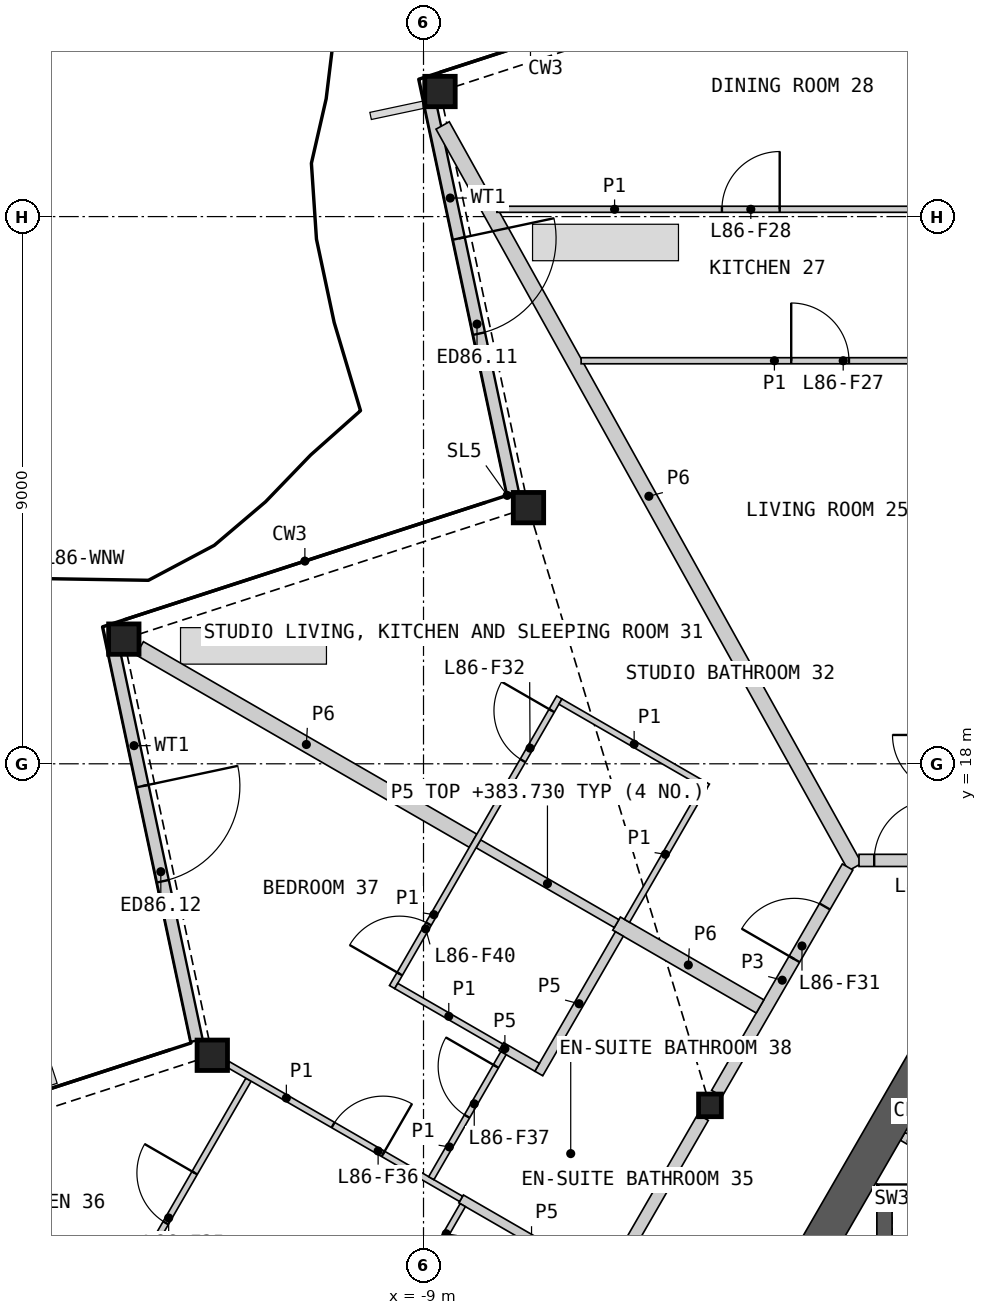
"""IFC4 building model, lengths in metres.
Left out: names, types, materials, properties, quantities, classifications, styles, units other than length and angle.
Written with IfcOpenShell. Run it as: python <this file> out.ifc"""

import sys

from ifc_helpers import new_model, si_unit, direction, frame, frame_2d, origin, origin_2d, place, context, subcontext, project, spatial, polyline, rectangle, hollow_rectangle, i_section, outline, extrude, element, fill, save


model = new_model("IFC4")
c1 = context("Model", 3, precision=1e-05, world=origin(), true_north=direction((0.0, 1.0)))
c2 = subcontext(c1, "Body", "Model", "MODEL_VIEW")
j1 = project(units=[si_unit("LENGTHUNIT", "METRE"), si_unit("PLANEANGLEUNIT", "RADIAN")], contexts=[c1])
p1 = place(None, origin())
s1 = spatial("IfcSite", under=j1, at=p1, CompositionType="ELEMENT")
p2 = place(p1, origin())
s2 = spatial("IfcBuilding", under=s1, at=p2, CompositionType="ELEMENT")
p3 = place(p2, frame((0.0, 0.0, 381.4)))
s3 = spatial("IfcBuildingStorey", under=s2, at=p3, CompositionType="ELEMENT", Elevation=381.4)
for number, where, z_axis, x_axis in (
    (1, (-8.729, 29.057, 0.0), (0.0, 0.0, 1.0), (1.0, 0.0, 0.0)),
    (2, (-7.274, 22.213, 0.0), (0.0, 0.0, 1.0), (1.0, 0.0, 0.0)),
    (3, (-13.929, 20.051, 0.0), (0.0, 0.0, 1.0), (1.0, 0.0, 0.0)),
    (4, (-12.474, 13.206, 0.0), (0.0, 0.0, 1.0), (1.0, 0.0, 0.0)),
):
    element("IfcColumn", number, at=place(p3, frame(where, z_axis=z_axis, x_axis=x_axis)), inside=s3, PredefinedType="COLUMN", context=c2, shape_type="SweptSolid", body=[
        extrude(hollow_rectangle(XDim=0.5, YDim=0.5, WallThickness=0.03, at=origin_2d()), origin(), (0.0, 0.0, 1.0), 3.4),
    ])
p4 = place(p3, frame((-4.289, 12.382, 0.0), z_axis=(0.0, 0.0, 1.0), x_axis=(1.0, 0.0, 0.0)))
e5 = element("IfcColumn", 5, at=p4, inside=s3, PredefinedType="COLUMN", context=c2, shape_type="SweptSolid", body=[
    extrude(i_section(OverallWidth=0.374, OverallDepth=0.372, WebThickness=0.016, FlangeThickness=0.026, at=origin_2d()), origin(), (0.0, 0.0, 1.0), 3.4),
])
p5 = place(p3, frame((-8.905, 28.922, 0.0), z_axis=(0.0, 0.0, 1.0), x_axis=(0.207917488951, -0.978146368285, 0.0)))
e6 = element("IfcWall", 6, at=p5, inside=s3, PredefinedType="SOLIDWALL", context=c2, shape_type="SweptSolid", body=[
    extrude(rectangle(XDim=6.612, YDim=0.2, at=frame_2d((3.306, 0.0))), origin(), (0.0, 0.0, 1.0), 2.634),
])
p6 = place(p5, frame((2.333, 0.0, 0.0)))
e7 = element("IfcOpeningElement", 7, at=p6, cuts=e6, PredefinedType="OPENING", context=c2, shape_type="SweptSolid", body=[
    extrude(rectangle(XDim=1.6, YDim=2.25, at=frame_2d((0.8, 1.125))), frame((0.0, 0.11, 0.0), z_axis=(0.0, -1.0, 0.0), x_axis=(1.0, 0.0, 0.0)), (0.0, 0.0, 1.0), 0.22),
])
p7 = place(p3, frame((-14.104, 19.915, 0.0), z_axis=(0.0, 0.0, 1.0), x_axis=(0.207924998532, -0.978144771997, 0.0)))
e8 = element("IfcWall", 8, at=p7, inside=s3, PredefinedType="SOLIDWALL", context=c2, shape_type="SweptSolid", body=[
    extrude(rectangle(XDim=6.612, YDim=0.2, at=frame_2d((3.306, 0.0))), origin(), (0.0, 0.0, 1.0), 2.634),
])
p8 = place(p7, frame((2.333, 0.0, 0.0)))
e9 = element("IfcOpeningElement", 9, at=p8, cuts=e8, PredefinedType="OPENING", context=c2, shape_type="SweptSolid", body=[
    extrude(rectangle(XDim=1.6, YDim=2.25, at=frame_2d((0.8, 1.125))), frame((0.0, 0.11, 0.0), z_axis=(0.0, -1.0, 0.0), x_axis=(1.0, 0.0, 0.0)), (0.0, 0.0, 1.0), 0.22),
])
p9 = place(p3, origin())
e10 = element("IfcWall", 10, at=p9, inside=s3, PredefinedType="SHEAR", context=c2, shape_type="SweptSolid", body=[
    extrude(outline(polyline([(1.544, 11.087), (-1.544, 11.087), (-1.294, 10.837), (1.294, 10.837), (1.544, 11.087)])), origin(), (0.0, 0.0, 1.0), 3.1),
])
p10 = place(p3, origin())
e11 = element("IfcWall", 11, at=p10, inside=s3, PredefinedType="SHEAR", context=c2, shape_type="SweptSolid", body=[
    extrude(outline(polyline([(-1.294, 10.837), (-1.544, 11.087), (-1.544, 5.237), (-1.294, 5.237), (-1.294, 10.837)])), origin(), (0.0, 0.0, 1.0), 3.1),
])
p11 = place(p3, frame((-1.119, 11.873, 0.0), z_axis=(0.0, 0.0, 1.0), x_axis=(0.865992812752, -0.500056445075, 0.0)))
e12 = element("IfcWall", 12, at=p11, inside=s3, PredefinedType="PARTITIONING", context=c2, shape_type="SweptSolid", body=[
    extrude(rectangle(XDim=1.582, YDim=0.15, at=frame_2d((0.791, 0.0))), origin(), (0.0, 0.0, 1.0), 3.1),
])
p12 = place(p3, frame((-0.26, 13.961, 0.0), z_axis=(0.0, 0.0, 1.0), x_axis=(-0.499980485389, -0.866036670257, 0.0)))
e13 = element("IfcWall", 13, at=p12, inside=s3, PredefinedType="SHEAR", context=c2, shape_type="SweptSolid", body=[
    extrude(rectangle(XDim=4.559, YDim=0.6, at=frame_2d((2.28, 0.0))), origin(), (0.0, 0.0, 1.0), 3.1),
])
p13 = place(p3, frame((-8.685, 28.499, 0.0), z_axis=(0.0, 0.0, 1.0), x_axis=(0.486017177904, -0.873949256412, 0.0)))
e14 = element("IfcWall", 14, at=p13, inside=s3, PredefinedType="PARTITIONING", context=c2, shape_type="SweptSolid", body=[
    extrude(rectangle(XDim=13.956, YDim=0.25, at=frame_2d((6.978, 0.0))), origin(), (0.0, 0.0, 1.0), 2.33),
])
p14 = place(p3, frame((-8.465, 5.15, 0.0), z_axis=(0.0, 0.0, 1.0), x_axis=(0.499992155518, 0.866029932751, 0.0)))
e15 = element("IfcWall", 15, at=p14, inside=s3, PredefinedType="PARTITIONING", context=c2, shape_type="SweptSolid", body=[
    extrude(rectangle(XDim=8.123, YDim=0.2, at=frame_2d((4.062, 0.0))), origin(), (0.0, 0.0, 1.0), 3.1),
])
p15 = place(p14, frame((1.153, 0.0, 0.0)))
e16 = element("IfcOpeningElement", 16, at=p15, cuts=e15, PredefinedType="OPENING", context=c2, shape_type="SweptSolid", body=[
    extrude(rectangle(XDim=1.0, YDim=2.1, at=frame_2d((0.5, 1.05))), frame((0.0, 0.11, 0.0), z_axis=(0.0, -1.0, 0.0), x_axis=(1.0, 0.0, 0.0)), (0.0, 0.0, 1.0), 0.22),
])
p16 = place(p3, frame((-13.669, 19.9, 0.0), z_axis=(0.0, 0.0, 1.0), x_axis=(0.866032778651, -0.499987226139, 0.0)))
e17 = element("IfcWall", 17, at=p16, inside=s3, PredefinedType="PARTITIONING", context=c2, shape_type="SweptSolid", body=[
    extrude(rectangle(XDim=6.332, YDim=0.25, at=frame_2d((3.166, 0.0))), origin(), (0.0, 0.0, 1.0), 2.33),
])
p17 = place(p3, frame((-4.176, 12.579, 0.0), z_axis=(0.0, 0.0, 1.0), x_axis=(0.500004215162, 0.866022970146, 0.0)))
e18 = element("IfcWall", 18, at=p17, inside=s3, PredefinedType="PARTITIONING", context=c2, shape_type="SweptSolid", body=[
    extrude(rectangle(XDim=4.3, YDim=0.2, at=frame_2d((2.15, 0.0))), origin(), (0.0, 0.0, 1.0), 3.1),
])
p18 = place(p17, frame((2.55, 0.0, 0.0)))
e19 = element("IfcOpeningElement", 19, at=p18, cuts=e18, PredefinedType="OPENING", context=c2, shape_type="SweptSolid", body=[
    extrude(rectangle(XDim=1.0, YDim=2.1, at=frame_2d((0.5, 1.05))), frame((0.0, 0.11, 0.0), z_axis=(0.0, -1.0, 0.0), x_axis=(1.0, 0.0, 0.0)), (0.0, 0.0, 1.0), 0.22),
])
p19 = place(p3, frame((-1.838, 16.411, 0.0), z_axis=(0.0, 0.0, 1.0), x_axis=(1.0, 0.0, 0.0)))
e20 = element("IfcWall", 20, at=p19, inside=s3, PredefinedType="PARTITIONING", context=c2, shape_type="SweptSolid", body=[
    extrude(rectangle(XDim=3.701, YDim=0.2, at=frame_2d((1.851, 0.0))), origin(), (0.0, 0.0, 1.0), 3.1),
])
p20 = place(p19, frame((0.25, 0.0, 0.0)))
e21 = element("IfcOpeningElement", 21, at=p20, cuts=e20, PredefinedType="OPENING", context=c2, shape_type="SweptSolid", body=[
    extrude(rectangle(XDim=1.0, YDim=2.1, at=frame_2d((0.5, 1.05))), frame((0.0, 0.11, 0.0), z_axis=(0.0, -1.0, 0.0), x_axis=(1.0, 0.0, 0.0)), (0.0, 0.0, 1.0), 0.22),
])
p21 = place(p3, frame((-5.825, 15.372, 0.0), z_axis=(0.0, 0.0, 1.0), x_axis=(0.866051307416, -0.49995513091, 0.0)))
e22 = element("IfcWall", 22, at=p21, inside=s3, PredefinedType="PARTITIONING", context=c2, shape_type="SweptSolid", body=[
    extrude(rectangle(XDim=2.725, YDim=0.25, at=frame_2d((1.362, 0.0))), origin(), (0.0, 0.0, 1.0), 2.33),
])
p22 = place(p3, frame((-8.098, 16.684, 0.0), z_axis=(0.0, 0.0, 1.0), x_axis=(0.866036909293, -0.499980071345, 0.0)))
e23 = element("IfcWall", 23, at=p22, inside=s3, PredefinedType="PLUMBINGWALL", context=c2, shape_type="SweptSolid", body=[
    extrude(rectangle(XDim=2.625, YDim=0.15, at=frame_2d((1.312, 0.0))), origin(), (0.0, 0.0, 1.0), 2.33),
])
p23 = place(p3, frame((-8.382, 10.844, 0.0), z_axis=(0.0, 0.0, 1.0), x_axis=(0.866021425885, -0.500006889861, 0.0)))
e24 = element("IfcWall", 24, at=p23, inside=s3, PredefinedType="PLUMBINGWALL", context=c2, shape_type="SweptSolid", body=[
    extrude(rectangle(XDim=2.675, YDim=0.15, at=frame_2d((1.337, 0.0))), origin(), (0.0, 0.0, 1.0), 2.33),
])
p24 = place(p3, frame((-7.104, 12.906, 0.0), z_axis=(0.0, 0.0, 1.0), x_axis=(0.499993606316, 0.866029095148, 0.0)))
e25 = element("IfcWall", 25, at=p24, inside=s3, PredefinedType="PLUMBINGWALL", context=c2, shape_type="SweptSolid", body=[
    extrude(rectangle(XDim=2.65, YDim=0.15, at=frame_2d((1.325, 0.0))), origin(), (0.0, 0.0, 1.0), 2.33),
])
p25 = place(p3, frame((-7.72, 13.349, 0.0), z_axis=(0.0, 0.0, 1.0), x_axis=(0.866113839764, -0.499846793097, 0.0)))
e26 = element("IfcWall", 26, at=p25, inside=s3, PredefinedType="PLUMBINGWALL", context=c2, shape_type="SweptSolid", body=[
    extrude(rectangle(XDim=0.68, YDim=0.15, at=frame_2d((0.34, 0.0))), origin(), (0.0, 0.0, 1.0), 2.33),
])
p26 = place(p3, frame((-18.869, 10.894, 0.0), z_axis=(0.0, 0.0, 1.0), x_axis=(0.866023724155, -0.500002909193, 0.0)))
e27 = element("IfcWall", 27, at=p26, inside=s3, PredefinedType="PARTITIONING", context=c2, shape_type="SweptSolid", body=[
    extrude(rectangle(XDim=11.655, YDim=0.1, at=frame_2d((5.827, 0.0))), origin(), (0.0, 0.0, 1.0), 2.33),
])
p27 = place(p26, frame((6.253, 0.0, 0.0)))
e28 = element("IfcOpeningElement", 28, at=p27, cuts=e27, PredefinedType="OPENING", context=c2, shape_type="SweptSolid", body=[
    extrude(rectangle(XDim=0.95, YDim=2.1, at=frame_2d((0.475, 1.05))), frame((0.0, 0.06, 0.0), z_axis=(0.0, -1.0, 0.0), x_axis=(1.0, 0.0, 0.0)), (0.0, 0.0, 1.0), 0.12),
])
p28 = place(p3, frame((-7.793, 27.12, 0.0), z_axis=(0.0, 0.0, 1.0), x_axis=(1.0, 0.0, 0.0)))
e29 = element("IfcWall", 29, at=p28, inside=s3, PredefinedType="PARTITIONING", context=c2, shape_type="SweptSolid", body=[
    extrude(rectangle(XDim=7.743, YDim=0.1, at=frame_2d((3.872, 0.0))), origin(), (0.0, 0.0, 1.0), 2.33),
])
p29 = place(p28, frame((3.701, 0.0, 0.0)))
e30 = element("IfcOpeningElement", 30, at=p29, cuts=e29, PredefinedType="OPENING", context=c2, shape_type="SweptSolid", body=[
    extrude(rectangle(XDim=0.95, YDim=2.1, at=frame_2d((0.475, 1.05))), frame((0.0, 0.06, 0.0), z_axis=(0.0, -1.0, 0.0), x_axis=(1.0, 0.0, 0.0)), (0.0, 0.0, 1.0), 0.12),
])
p30 = place(p3, frame((-6.408, 24.629, 0.0), z_axis=(0.0, 0.0, 1.0), x_axis=(1.0, 0.0, 0.0)))
e31 = element("IfcWall", 31, at=p30, inside=s3, PredefinedType="PARTITIONING", context=c2, shape_type="SweptSolid", body=[
    extrude(rectangle(XDim=6.358, YDim=0.1, at=frame_2d((3.179, 0.0))), origin(), (0.0, 0.0, 1.0), 2.33),
])
p31 = place(p30, frame((3.455, 0.0, 0.0)))
e32 = element("IfcOpeningElement", 32, at=p31, cuts=e31, PredefinedType="OPENING", context=c2, shape_type="SweptSolid", body=[
    extrude(rectangle(XDim=0.95, YDim=2.1, at=frame_2d((0.475, 1.05))), frame((0.0, 0.06, 0.0), z_axis=(0.0, -1.0, 0.0), x_axis=(1.0, 0.0, 0.0)), (0.0, 0.0, 1.0), 0.12),
])
p32 = place(p3, frame((-9.517, 14.328, 0.0), z_axis=(0.0, 0.0, 1.0), x_axis=(0.499996545922, 0.866027397988, 0.0)))
e33 = element("IfcWall", 33, at=p32, inside=s3, PredefinedType="PARTITIONING", context=c2, shape_type="SweptSolid", body=[
    extrude(rectangle(XDim=5.5, YDim=0.1, at=frame_2d((2.75, 0.0))), origin(), (0.0, 0.0, 1.0), 2.33),
])
p33 = place(p32, frame((4.3, 0.0, 0.0)))
e34 = element("IfcOpeningElement", 34, at=p33, cuts=e33, PredefinedType="OPENING", context=c2, shape_type="SweptSolid", body=[
    extrude(rectangle(XDim=0.95, YDim=2.1, at=frame_2d((0.475, 1.05))), frame((0.0, 0.06, 0.0), z_axis=(0.0, -1.0, 0.0), x_axis=(1.0, 0.0, 0.0)), (0.0, 0.0, 1.0), 0.12),
])
p34 = place(p32, frame((0.25, 0.0, 0.0)))
e35 = element("IfcOpeningElement", 35, at=p34, cuts=e33, PredefinedType="OPENING", context=c2, shape_type="SweptSolid", body=[
    extrude(rectangle(XDim=0.95, YDim=2.1, at=frame_2d((0.475, 1.05))), frame((0.0, 0.06, 0.0), z_axis=(0.0, -1.0, 0.0), x_axis=(1.0, 0.0, 0.0)), (0.0, 0.0, 1.0), 0.12),
])
p35 = place(p3, frame((-14.428, 8.388, 0.0), z_axis=(0.0, 0.0, 1.0), x_axis=(0.500005610874, 0.86602216432, 0.0)))
e36 = element("IfcWall", 36, at=p35, inside=s3, PredefinedType="PARTITIONING", context=c2, shape_type="SweptSolid", body=[
    extrude(rectangle(XDim=5.1, YDim=0.1, at=frame_2d((2.55, 0.0))), origin(), (0.0, 0.0, 1.0), 2.33),
])
p36 = place(p35, frame((2.379, 0.0, 0.0)))
e37 = element("IfcOpeningElement", 37, at=p36, cuts=e36, PredefinedType="OPENING", context=c2, shape_type="SweptSolid", body=[
    extrude(rectangle(XDim=0.95, YDim=2.1, at=frame_2d((0.475, 1.05))), frame((0.0, 0.06, 0.0), z_axis=(0.0, -1.0, 0.0), x_axis=(1.0, 0.0, 0.0)), (0.0, 0.0, 1.0), 0.12),
])
p37 = place(p3, frame((-12.214, 13.056, 0.0), z_axis=(0.0, 0.0, 1.0), x_axis=(0.866017452598, -0.500013771606, 0.0)))
e38 = element("IfcWall", 38, at=p37, inside=s3, PredefinedType="PARTITIONING", context=c2, shape_type="SweptSolid", body=[
    extrude(rectangle(XDim=4.425, YDim=0.1, at=frame_2d((2.213, 0.0))), origin(), (0.0, 0.0, 1.0), 2.33),
])
p38 = place(p37, frame((1.994, 0.0, 0.0)))
e39 = element("IfcOpeningElement", 39, at=p38, cuts=e38, PredefinedType="OPENING", context=c2, shape_type="SweptSolid", body=[
    extrude(rectangle(XDim=0.95, YDim=2.1, at=frame_2d((0.475, 1.05))), frame((0.0, 0.06, 0.0), z_axis=(0.0, -1.0, 0.0), x_axis=(1.0, 0.0, 0.0)), (0.0, 0.0, 1.0), 0.12),
])
p39 = place(p3, frame((-6.748, 19.023, 0.0), z_axis=(0.0, 0.0, 1.0), x_axis=(0.866034573852, -0.49998411664, 0.0)))
e40 = element("IfcWall", 40, at=p39, inside=s3, PredefinedType="PARTITIONING", context=c2, shape_type="SweptSolid", body=[
    extrude(rectangle(XDim=2.8, YDim=0.1, at=frame_2d((1.4, 0.0))), origin(), (0.0, 0.0, 1.0), 2.33),
])
p40 = place(p3, frame((-5.654, 15.418, 0.0), z_axis=(0.0, 0.0, 1.0), x_axis=(0.500048846702, 0.865997200291, 0.0)))
e41 = element("IfcWall", 41, at=p40, inside=s3, PredefinedType="PARTITIONING", context=c2, shape_type="SweptSolid", body=[
    extrude(rectangle(XDim=2.525, YDim=0.1, at=frame_2d((1.263, 0.0))), origin(), (0.0, 0.0, 1.0), 2.33),
])
p41 = place(p3, frame((-8.872, 11.184, 0.0), z_axis=(0.0, 0.0, 1.0), x_axis=(0.499986429846, 0.866033238375, 0.0)))
e42 = element("IfcWall", 42, at=p41, inside=s3, PredefinedType="PARTITIONING", context=c2, shape_type="SweptSolid", body=[
    extrude(rectangle(XDim=2.375, YDim=0.1, at=frame_2d((1.188, 0.0))), origin(), (0.0, 0.0, 1.0), 2.33),
])
p42 = place(p41, frame((1.175, 0.0, 0.0)))
e43 = element("IfcOpeningElement", 43, at=p42, cuts=e42, PredefinedType="OPENING", context=c2, shape_type="SweptSolid", body=[
    extrude(rectangle(XDim=0.95, YDim=2.1, at=frame_2d((0.475, 1.05))), frame((0.0, 0.06, 0.0), z_axis=(0.0, -1.0, 0.0), x_axis=(1.0, 0.0, 0.0)), (0.0, 0.0, 1.0), 0.12),
])
p43 = place(p3, frame((-9.442, 8.858, 0.0), z_axis=(0.0, 0.0, 1.0), x_axis=(0.499978335414, 0.866037911478, 0.0)))
e44 = element("IfcWall", 44, at=p43, inside=s3, PredefinedType="PARTITIONING", context=c2, shape_type="SweptSolid", body=[
    extrude(rectangle(XDim=2.175, YDim=0.1, at=frame_2d((1.087, 0.0))), origin(), (0.0, 0.0, 1.0), 2.33),
])
p44 = place(p43, frame((0.25, 0.0, 0.0)))
e45 = element("IfcOpeningElement", 45, at=p44, cuts=e44, PredefinedType="OPENING", context=c2, shape_type="SweptSolid", body=[
    extrude(rectangle(XDim=0.95, YDim=2.1, at=frame_2d((0.475, 1.05))), frame((0.0, 0.06, 0.0), z_axis=(0.0, -1.0, 0.0), x_axis=(1.0, 0.0, 0.0)), (0.0, 0.0, 1.0), 0.12),
])
p45 = place(p3, frame((-9.448, 14.346, 0.0), z_axis=(0.0, 0.0, 1.0), x_axis=(0.866020521143, -0.500008456887, 0.0)))
e46 = element("IfcWall", 46, at=p45, inside=s3, PredefinedType="PARTITIONING", context=c2, shape_type="SweptSolid", body=[
    extrude(rectangle(XDim=1.995, YDim=0.1, at=frame_2d((0.998, 0.0))), origin(), (0.0, 0.0, 1.0), 2.33),
])
p46 = place(p6, origin())
e47 = element("IfcDoor", 47, at=p46, inside=s3, OperationType="DOUBLE_DOOR_SINGLE_SWING", PredefinedType="DOOR", context=c2, shape_type="SweptSolid", body=[
    extrude(rectangle(XDim=1.6, YDim=2.25, at=frame_2d((0.8, 1.125))), frame((0.0, 0.025, 0.0), z_axis=(0.0, -1.0, 0.0), x_axis=(1.0, 0.0, 0.0)), (0.0, 0.0, 1.0), 0.05),
])
fill(e7, e47)
p47 = place(p8, origin())
e48 = element("IfcDoor", 48, at=p47, inside=s3, OperationType="DOUBLE_DOOR_SINGLE_SWING", PredefinedType="DOOR", context=c2, shape_type="SweptSolid", body=[
    extrude(rectangle(XDim=1.6, YDim=2.25, at=frame_2d((0.8, 1.125))), frame((0.0, 0.025, 0.0), z_axis=(0.0, -1.0, 0.0), x_axis=(1.0, 0.0, 0.0)), (0.0, 0.0, 1.0), 0.05),
])
fill(e9, e48)
p48 = place(p20, origin())
e49 = element("IfcDoor", 49, at=p48, inside=s3, OperationType="SINGLE_SWING_RIGHT", PredefinedType="DOOR", context=c2, shape_type="SweptSolid", body=[
    extrude(rectangle(XDim=1.0, YDim=2.1, at=frame_2d((0.5, 1.05))), frame((0.0, 0.025, 0.0), z_axis=(0.0, -1.0, 0.0), x_axis=(1.0, 0.0, 0.0)), (0.0, 0.0, 1.0), 0.05),
])
fill(e21, e49)
p49 = place(p31, origin())
e50 = element("IfcDoor", 50, at=p49, inside=s3, OperationType="SINGLE_SWING_LEFT", PredefinedType="DOOR", context=c2, shape_type="SweptSolid", body=[
    extrude(rectangle(XDim=0.95, YDim=2.1, at=frame_2d((0.475, 1.05))), frame((0.0, 0.025, 0.0), z_axis=(0.0, -1.0, 0.0), x_axis=(1.0, 0.0, 0.0)), (0.0, 0.0, 1.0), 0.05),
])
fill(e32, e50)
p50 = place(p29, origin())
e51 = element("IfcDoor", 51, at=p50, inside=s3, OperationType="SINGLE_SWING_RIGHT", PredefinedType="DOOR", context=c2, shape_type="SweptSolid", body=[
    extrude(rectangle(XDim=0.95, YDim=2.1, at=frame_2d((0.475, 1.05))), frame((0.0, 0.025, 0.0), z_axis=(0.0, -1.0, 0.0), x_axis=(1.0, 0.0, 0.0)), (0.0, 0.0, 1.0), 0.05),
])
fill(e30, e51)
p51 = place(p18, origin())
e52 = element("IfcDoor", 52, at=p51, inside=s3, OperationType="SINGLE_SWING_LEFT", PredefinedType="DOOR", context=c2, shape_type="SweptSolid", body=[
    extrude(rectangle(XDim=1.0, YDim=2.1, at=frame_2d((0.5, 1.05))), frame((0.0, 0.025, 0.0), z_axis=(0.0, -1.0, 0.0), x_axis=(1.0, 0.0, 0.0)), (0.0, 0.0, 1.0), 0.05),
])
fill(e19, e52)
p52 = place(p33, origin())
e53 = element("IfcDoor", 53, at=p52, inside=s3, OperationType="SINGLE_SWING_RIGHT", PredefinedType="DOOR", context=c2, shape_type="SweptSolid", body=[
    extrude(rectangle(XDim=0.95, YDim=2.1, at=frame_2d((0.475, 1.05))), frame((0.0, 0.025, 0.0), z_axis=(0.0, -1.0, 0.0), x_axis=(1.0, 0.0, 0.0)), (0.0, 0.0, 1.0), 0.05),
])
fill(e34, e53)
p53 = place(p36, origin())
e54 = element("IfcDoor", 54, at=p53, inside=s3, OperationType="SINGLE_SWING_RIGHT", PredefinedType="DOOR", context=c2, shape_type="SweptSolid", body=[
    extrude(rectangle(XDim=0.95, YDim=2.1, at=frame_2d((0.475, 1.05))), frame((0.0, 0.025, 0.0), z_axis=(0.0, -1.0, 0.0), x_axis=(1.0, 0.0, 0.0)), (0.0, 0.0, 1.0), 0.05),
])
fill(e37, e54)
p54 = place(p38, origin())
e55 = element("IfcDoor", 55, at=p54, inside=s3, OperationType="SINGLE_SWING_RIGHT", PredefinedType="DOOR", context=c2, shape_type="SweptSolid", body=[
    extrude(rectangle(XDim=0.95, YDim=2.1, at=frame_2d((0.475, 1.05))), frame((0.0, 0.025, 0.0), z_axis=(0.0, -1.0, 0.0), x_axis=(1.0, 0.0, 0.0)), (0.0, 0.0, 1.0), 0.05),
])
fill(e39, e55)
p55 = place(p42, origin())
e56 = element("IfcDoor", 56, at=p55, inside=s3, OperationType="SINGLE_SWING_RIGHT", PredefinedType="DOOR", context=c2, shape_type="SweptSolid", body=[
    extrude(rectangle(XDim=0.95, YDim=2.1, at=frame_2d((0.475, 1.05))), frame((0.0, 0.025, 0.0), z_axis=(0.0, -1.0, 0.0), x_axis=(1.0, 0.0, 0.0)), (0.0, 0.0, 1.0), 0.05),
])
fill(e43, e56)
p56 = place(p34, origin())
e57 = element("IfcDoor", 57, at=p56, inside=s3, OperationType="SINGLE_SWING_LEFT", PredefinedType="DOOR", context=c2, shape_type="SweptSolid", body=[
    extrude(rectangle(XDim=0.95, YDim=2.1, at=frame_2d((0.475, 1.05))), frame((0.0, 0.025, 0.0), z_axis=(0.0, -1.0, 0.0), x_axis=(1.0, 0.0, 0.0)), (0.0, 0.0, 1.0), 0.05),
])
fill(e35, e57)
save(model, sys.argv[1])
